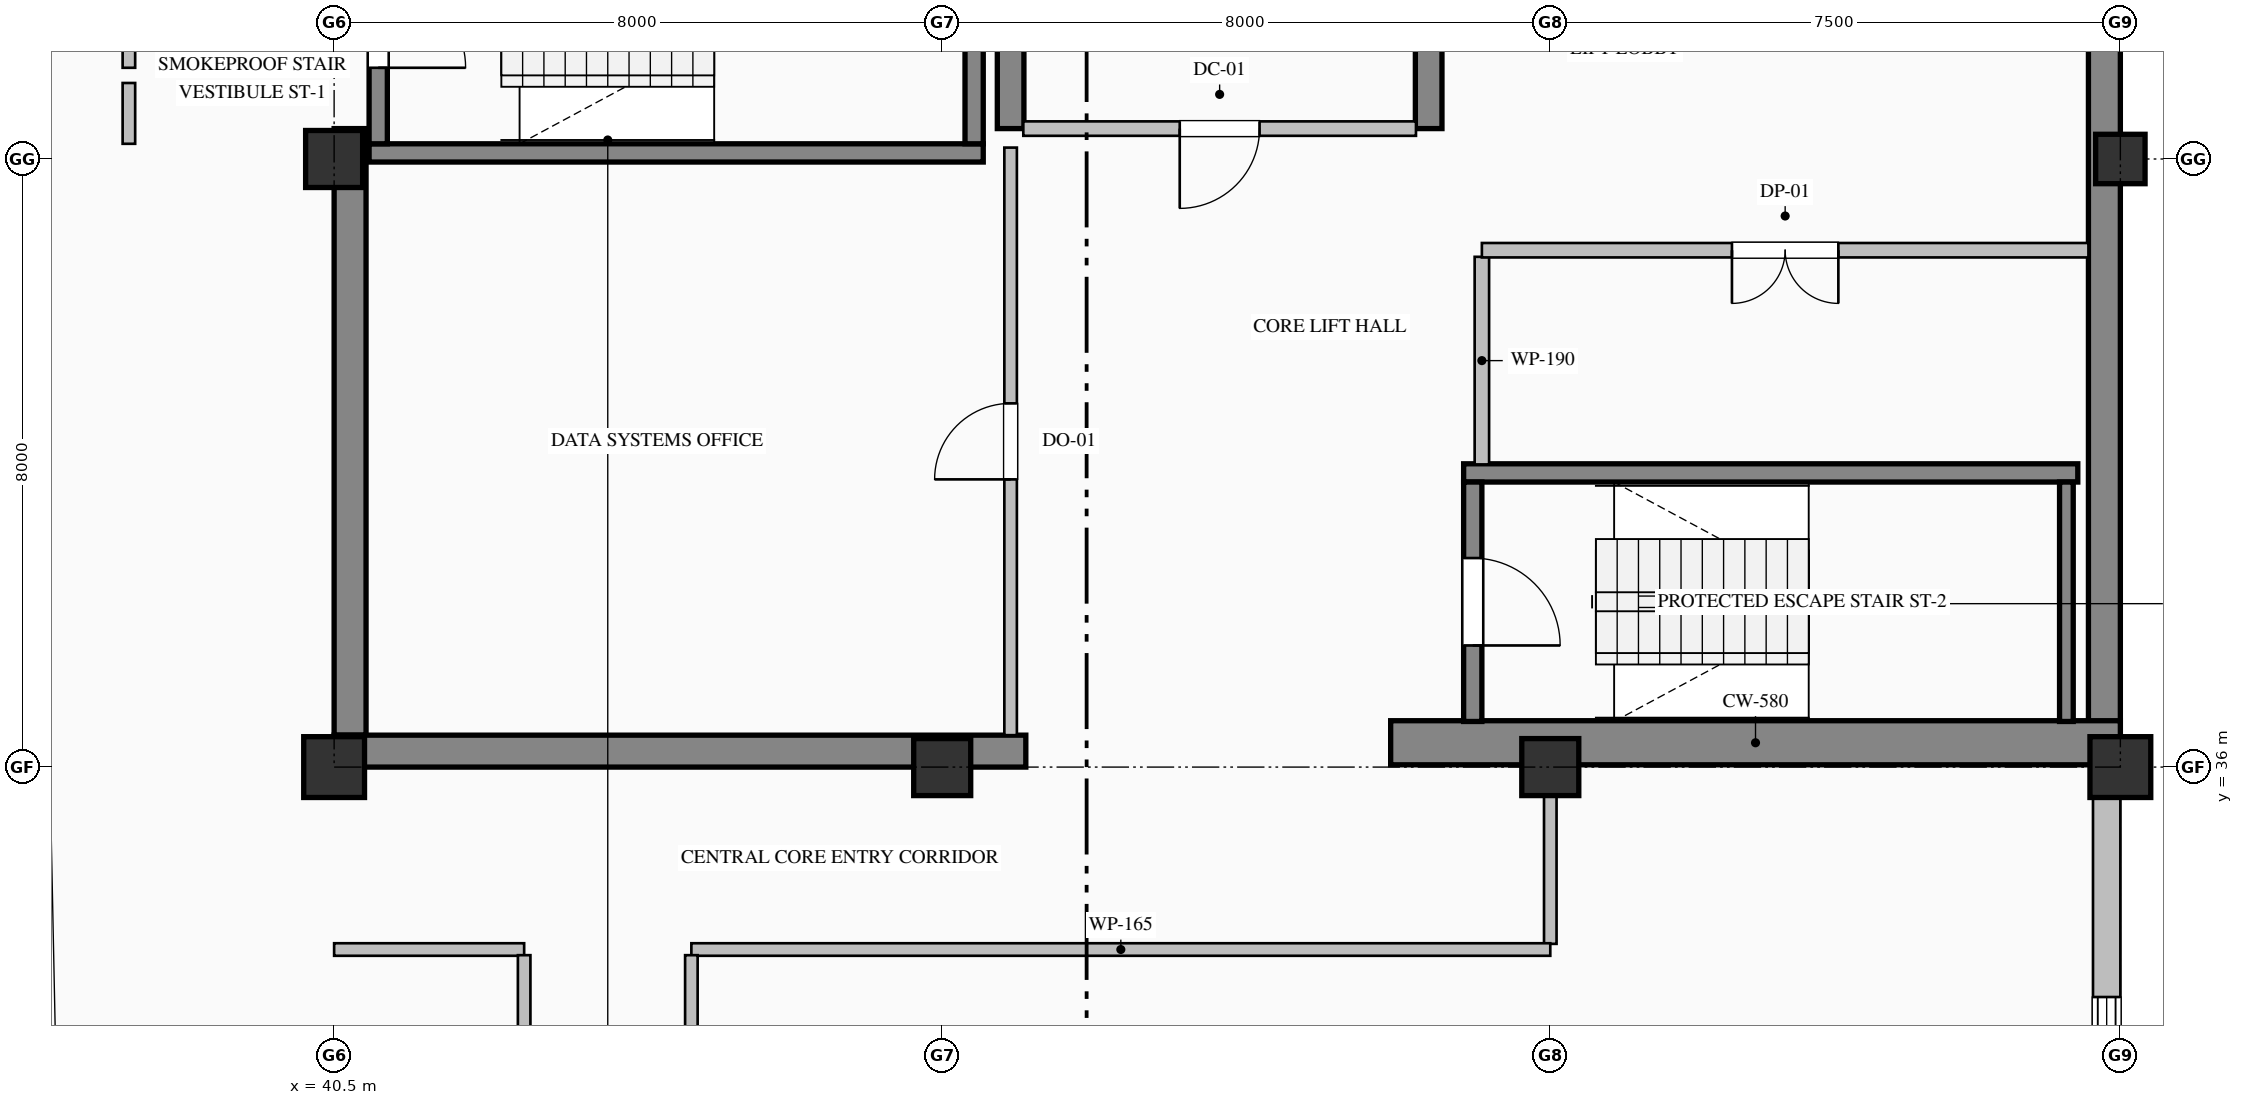
"""IFC4 building model, lengths in metres.
Left out: names, types, materials, properties, quantities, classifications, styles, units other than length and angle.
Written with IfcOpenShell. Run it as: python <this file> out.ifc"""

import sys

from ifc_helpers import new_model, si_unit, direction, frame, frame_2d, origin, origin_2d, place, context, subcontext, project, spatial, rectangle, hollow_rectangle, extrude, element, fill, save


model = new_model("IFC4")
c1 = context("Model", 3, precision=1e-05, world=origin(), true_north=direction((0.0, 1.0)))
c2 = subcontext(c1, "Body", "Model", "MODEL_VIEW")
j1 = project(units=[si_unit("LENGTHUNIT", "METRE"), si_unit("PLANEANGLEUNIT", "RADIAN")], contexts=[c1])
p1 = place(None, origin())
s1 = spatial("IfcSite", under=j1, at=p1, CompositionType="ELEMENT")
p2 = place(p1, origin())
s2 = spatial("IfcBuilding", under=s1, at=p2, CompositionType="ELEMENT")
p3 = place(p2, frame((0.0, 0.0, 303.2)))
s3 = spatial("IfcBuildingStorey", under=s2, at=p3, CompositionType="ELEMENT", Elevation=303.2)
p4 = place(p3, frame((63.79, 36.32, 0.0), z_axis=(0.0, 0.0, 1.0), x_axis=(0.0, 1.0, 0.0)))
e1 = element("IfcWall", 1, at=p4, inside=s3, PredefinedType="SHEAR", context=c2, shape_type="SweptSolid", body=[
    extrude(rectangle(XDim=15.26, YDim=0.42, at=frame_2d((7.63, 0.0))), origin(), (0.0, 0.0, 1.0), 3.785),
])
p5 = place(p3, frame((40.71, 36.42, 0.0), z_axis=(0.0, 0.0, 1.0), x_axis=(0.0, 1.0, 0.0)))
e2 = element("IfcWall", 2, at=p5, inside=s3, PredefinedType="SHEAR", context=c2, shape_type="SweptSolid", body=[
    extrude(rectangle(XDim=7.98, YDim=0.42, at=frame_2d((3.99, 0.0))), origin(), (0.0, 0.0, 1.0), 3.785),
])
p6 = place(p3, frame((40.5, 36.21, 0.0), z_axis=(0.0, 0.0, 1.0), x_axis=(1.0, 0.0, 0.0)))
e3 = element("IfcWall", 3, at=p6, inside=s3, PredefinedType="SHEAR", context=c2, shape_type="SweptSolid", body=[
    extrude(rectangle(XDim=9.1, YDim=0.42, at=frame_2d((4.55, 0.0))), origin(), (0.0, 0.0, 1.0), 3.785),
])
p7 = place(p3, frame((54.4, 36.32, 0.0), z_axis=(0.0, 0.0, 1.0), x_axis=(1.0, 0.0, 0.0)))
e4 = element("IfcWall", 4, at=p7, inside=s3, PredefinedType="SHEAR", context=c2, shape_type="SweptSolid", body=[
    extrude(rectangle(XDim=9.6, YDim=0.58, at=frame_2d((4.8, 0.0))), origin(), (0.0, 0.0, 1.0), 4.0),
])
p8 = place(p3, frame((49.4, 44.4, 0.0), z_axis=(0.0, 0.0, 1.0), x_axis=(0.0, 1.0, 0.0)))
e5 = element("IfcWall", 5, at=p8, inside=s3, PredefinedType="SHEAR", context=c2, shape_type="SweptSolid", body=[
    extrude(rectangle(XDim=3.0, YDim=0.35, at=frame_2d((1.5, 0.0))), origin(), (0.0, 0.0, 1.0), 3.785),
])
p9 = place(p3, frame((54.9, 44.4, 0.0), z_axis=(0.0, 0.0, 1.0), x_axis=(0.0, 1.0, 0.0)))
e6 = element("IfcWall", 6, at=p9, inside=s3, PredefinedType="SHEAR", context=c2, shape_type="SweptSolid", body=[
    extrude(rectangle(XDim=7.18, YDim=0.35, at=frame_2d((3.59, 0.0))), origin(), (0.0, 0.0, 1.0), 3.785),
])
p10 = place(p3, frame((40.5, 36.0, 0.0), z_axis=(0.0, 0.0, 1.0), x_axis=(1.0, 0.0, 0.0)))
e7 = element("IfcColumn", 7, at=p10, inside=s3, PredefinedType="COLUMN", context=c2, shape_type="SweptSolid", body=[
    extrude(hollow_rectangle(XDim=0.8, YDim=0.8, WallThickness=0.032, at=origin_2d()), origin(), (0.0, 0.0, 1.0), 4.0),
])
for number, where, z_axis, x_axis in (
    (8, (40.5, 44.0, 0.0), (0.0, 0.0, 1.0), (1.0, 0.0, 0.0)),
    (9, (48.5, 36.0, 0.0), (0.0, 0.0, 1.0), (1.0, 0.0, 0.0)),
    (10, (56.5, 36.0, 0.0), (0.0, 0.0, 1.0), (1.0, 0.0, 0.0)),
):
    element("IfcColumn", number, at=place(p3, frame(where, z_axis=z_axis, x_axis=x_axis)), inside=s3, PredefinedType="COLUMN", context=c2, shape_type="SweptSolid", body=[
        extrude(rectangle(XDim=0.75, YDim=0.75, at=origin_2d()), origin(), (0.0, 0.0, 1.0), 4.0),
    ])
p11 = place(p3, frame((64.0, 36.0, 0.0), z_axis=(0.0, 0.0, 1.0), x_axis=(1.0, 0.0, 0.0)))
e11 = element("IfcColumn", 11, at=p11, inside=s3, PredefinedType="COLUMN", context=c2, shape_type="SweptSolid", body=[
    extrude(hollow_rectangle(XDim=0.8, YDim=0.8, WallThickness=0.032, at=origin_2d()), origin(), (0.0, 0.0, 1.0), 4.0),
])
p12 = place(p3, frame((64.0, 44.0, 0.0), z_axis=(0.0, 0.0, 1.0), x_axis=(1.0, 0.0, 0.0)))
e12 = element("IfcColumn", 12, at=p12, inside=s3, PredefinedType="COLUMN", context=c2, shape_type="SweptSolid", body=[
    extrude(hollow_rectangle(XDim=0.65, YDim=0.65, WallThickness=0.028, at=origin_2d()), origin(), (0.0, 0.0, 1.0), 4.0),
])
p13 = place(p3, frame((63.82, 36.05, 0.0), z_axis=(0.0, 0.0, 1.0), x_axis=(0.0, -1.0, 0.0)))
e13 = element("IfcWall", 13, at=p13, inside=s3, PredefinedType="SOLIDWALL", context=c2, shape_type="SweptSolid", body=[
    extrude(rectangle(XDim=13.55, YDim=0.36, at=frame_2d((6.775, 0.0))), origin(), (0.0, 0.0, 1.0), 3.335),
])
p14 = place(p13, frame((3.075, 0.0, 0.8)))
e14 = element("IfcOpeningElement", 14, at=p14, cuts=e13, PredefinedType="OPENING", context=c2, shape_type="SweptSolid", body=[
    extrude(rectangle(XDim=1.05, YDim=2.15, at=frame_2d((0.525, 1.075))), frame((0.0, 0.19, 0.0), z_axis=(0.0, -1.0, 0.0), x_axis=(1.0, 0.0, 0.0)), (0.0, 0.0, 1.0), 0.38),
])
p15 = place(p3, frame((49.04, 44.08, 0.0), z_axis=(0.0, 0.0, 1.0), x_axis=(-1.0, 0.0, 0.0)))
e15 = element("IfcWall", 15, at=p15, inside=s3, PredefinedType="SOLIDWALL", context=c2, shape_type="SweptSolid", body=[
    extrude(rectangle(XDim=8.08, YDim=0.24, at=frame_2d((4.04, 0.0))), origin(), (0.0, 0.0, 1.0), 4.0),
])
p16 = place(p3, frame((41.08, 47.35, 0.0), z_axis=(0.0, 0.0, 1.0), x_axis=(0.0, -1.0, 0.0)))
e16 = element("IfcWall", 16, at=p16, inside=s3, PredefinedType="SOLIDWALL", context=c2, shape_type="SweptSolid", body=[
    extrude(rectangle(XDim=3.15, YDim=0.24, at=frame_2d((1.575, 0.0))), origin(), (0.0, 0.0, 1.0), 4.0),
])
p17 = place(p16, frame((1.0, 0.0, 0.0)))
e17 = element("IfcOpeningElement", 17, at=p17, cuts=e16, PredefinedType="OPENING", context=c2, shape_type="SweptSolid", body=[
    extrude(rectangle(XDim=1.15, YDim=2.2, at=frame_2d((0.575, 1.1))), frame((0.0, 0.13, 0.0), z_axis=(0.0, -1.0, 0.0), x_axis=(1.0, 0.0, 0.0)), (0.0, 0.0, 1.0), 0.26),
])
p18 = place(p3, frame((48.92, 44.2, 0.0), z_axis=(0.0, 0.0, 1.0), x_axis=(0.0, 1.0, 0.0)))
e18 = element("IfcWall", 18, at=p18, inside=s3, PredefinedType="SOLIDWALL", context=c2, shape_type="SweptSolid", body=[
    extrude(rectangle(XDim=3.15, YDim=0.24, at=frame_2d((1.575, 0.0))), origin(), (0.0, 0.0, 1.0), 4.0),
])
p19 = place(p3, frame((55.36, 39.87, 0.0), z_axis=(0.0, 0.0, 1.0), x_axis=(1.0, 0.0, 0.0)))
e19 = element("IfcWall", 19, at=p19, inside=s3, PredefinedType="SOLIDWALL", context=c2, shape_type="SweptSolid", body=[
    extrude(rectangle(XDim=8.08, YDim=0.24, at=frame_2d((4.04, 0.0))), origin(), (0.0, 0.0, 1.0), 4.0),
])
p20 = place(p3, frame((55.48, 39.75, 0.0), z_axis=(0.0, 0.0, 1.0), x_axis=(0.0, -1.0, 0.0)))
e20 = element("IfcWall", 20, at=p20, inside=s3, PredefinedType="SOLIDWALL", context=c2, shape_type="SweptSolid", body=[
    extrude(rectangle(XDim=3.15, YDim=0.24, at=frame_2d((1.575, 0.0))), origin(), (0.0, 0.0, 1.0), 4.0),
])
p21 = place(p20, frame((1.0, 0.0, 0.0)))
e21 = element("IfcOpeningElement", 21, at=p21, cuts=e20, PredefinedType="OPENING", context=c2, shape_type="SweptSolid", body=[
    extrude(rectangle(XDim=1.15, YDim=2.2, at=frame_2d((0.575, 1.1))), frame((0.0, 0.13, 0.0), z_axis=(0.0, -1.0, 0.0), x_axis=(1.0, 0.0, 0.0)), (0.0, 0.0, 1.0), 0.26),
])
p22 = place(p3, frame((63.29, 36.6, 0.0), z_axis=(0.0, 0.0, 1.0), x_axis=(0.0, 1.0, 0.0)))
e22 = element("IfcWall", 22, at=p22, inside=s3, PredefinedType="SOLIDWALL", context=c2, shape_type="SweptSolid", body=[
    extrude(rectangle(XDim=3.15, YDim=0.18, at=frame_2d((1.575, 0.0))), origin(), (0.0, 0.0, 1.0), 4.0),
])
p23 = place(p3, frame((37.8, 45.2, 0.0), z_axis=(0.0, 0.0, 1.0), x_axis=(0.0, 1.0, 0.0)))
e23 = element("IfcWall", 23, at=p23, inside=s3, PredefinedType="PARTITIONING", context=c2, shape_type="SweptSolid", body=[
    extrude(rectangle(XDim=2.125, YDim=0.165, at=frame_2d((1.063, 0.0))), origin(), (0.0, 0.0, 1.0), 3.785),
])
p24 = place(p23, frame((0.538, 0.0, 0.0)))
e24 = element("IfcOpeningElement", 24, at=p24, cuts=e23, PredefinedType="OPENING", context=c2, shape_type="SweptSolid", body=[
    extrude(rectangle(XDim=1.05, YDim=2.15, at=frame_2d((0.525, 1.075))), frame((0.0, 0.093, 0.0), z_axis=(0.0, -1.0, 0.0), x_axis=(1.0, 0.0, 0.0)), (0.0, 0.0, 1.0), 0.185),
])
p25 = place(p3, frame((37.8, 44.2, 0.0), z_axis=(0.0, 0.0, 1.0), x_axis=(0.0, 1.0, 0.0)))
e25 = element("IfcWall", 25, at=p25, inside=s3, PredefinedType="PARTITIONING", context=c2, shape_type="SweptSolid", body=[
    extrude(rectangle(XDim=0.8, YDim=0.165, at=frame_2d((0.4, 0.0))), origin(), (0.0, 0.0, 1.0), 3.785),
])
p26 = place(p3, frame((54.733, 44.4, 0.0), z_axis=(0.0, 0.0, 1.0), x_axis=(-1.0, 0.0, 0.0)))
e26 = element("IfcWall", 26, at=p26, inside=s3, PredefinedType="PARTITIONING", context=c2, shape_type="SweptSolid", body=[
    extrude(rectangle(XDim=5.166, YDim=0.19, at=frame_2d((2.583, 0.0))), origin(), (0.0, 0.0, 1.0), 3.785),
])
p27 = place(p26, frame((2.058, 0.0, 0.0)))
e27 = element("IfcOpeningElement", 27, at=p27, cuts=e26, PredefinedType="OPENING", context=c2, shape_type="SweptSolid", body=[
    extrude(rectangle(XDim=1.05, YDim=2.15, at=frame_2d((0.525, 1.075))), frame((0.0, 0.105, 0.0), z_axis=(0.0, -1.0, 0.0), x_axis=(1.0, 0.0, 0.0)), (0.0, 0.0, 1.0), 0.21),
])
p28 = place(p3, frame((49.4, 36.42, 0.0), z_axis=(0.0, 0.0, 1.0), x_axis=(0.0, 1.0, 0.0)))
e28 = element("IfcWall", 28, at=p28, inside=s3, PredefinedType="PARTITIONING", context=c2, shape_type="SweptSolid", body=[
    extrude(rectangle(XDim=7.73, YDim=0.165, at=frame_2d((3.865, 0.0))), origin(), (0.0, 0.0, 1.0), 3.027),
])
p29 = place(p28, frame((3.365, 0.0, 0.0)))
e29 = element("IfcOpeningElement", 29, at=p29, cuts=e28, PredefinedType="OPENING", context=c2, shape_type="SweptSolid", body=[
    extrude(rectangle(XDim=1.0, YDim=2.15, at=frame_2d((0.5, 1.075))), frame((0.0, 0.093, 0.0), z_axis=(0.0, -1.0, 0.0), x_axis=(1.0, 0.0, 0.0)), (0.0, 0.0, 1.0), 0.185),
])
p30 = place(p3, frame((55.6, 42.713, 0.0), z_axis=(0.0, 0.0, 1.0), x_axis=(0.0, -1.0, 0.0)))
e30 = element("IfcWall", 30, at=p30, inside=s3, PredefinedType="PARTITIONING", context=c2, shape_type="SweptSolid", body=[
    extrude(rectangle(XDim=2.731, YDim=0.19, at=frame_2d((1.365, 0.0))), origin(), (0.0, 0.0, 1.0), 3.785),
])
p31 = place(p3, frame((63.58, 42.8, 0.0), z_axis=(0.0, 0.0, 1.0), x_axis=(-1.0, 0.0, 0.0)))
e31 = element("IfcWall", 31, at=p31, inside=s3, PredefinedType="PARTITIONING", context=c2, shape_type="SweptSolid", body=[
    extrude(rectangle(XDim=7.98, YDim=0.19, at=frame_2d((3.99, 0.0))), origin(), (0.0, 0.0, 1.0), 3.785),
])
p32 = place(p31, frame((3.29, 0.0, 0.0)))
e32 = element("IfcOpeningElement", 32, at=p32, cuts=e31, PredefinedType="OPENING", context=c2, shape_type="SweptSolid", body=[
    extrude(rectangle(XDim=1.4, YDim=2.25, at=frame_2d((0.7, 1.125))), frame((0.0, 0.105, 0.0), z_axis=(0.0, -1.0, 0.0), x_axis=(1.0, 0.0, 0.0)), (0.0, 0.0, 1.0), 0.21),
])
p33 = place(p3, frame((56.5, 36.0, 0.0), z_axis=(0.0, 0.0, 1.0), x_axis=(0.0, -1.0, 0.0)))
e33 = element("IfcWall", 33, at=p33, inside=s3, PredefinedType="PARTITIONING", context=c2, shape_type="SweptSolid", body=[
    extrude(rectangle(XDim=2.325, YDim=0.165, at=frame_2d((1.163, 0.0))), origin(), (0.0, 0.0, 1.0), 3.177),
])
p34 = place(p3, frame((56.5, 33.6, 0.0), z_axis=(0.0, 0.0, 1.0), x_axis=(-1.0, 0.0, 0.0)))
e34 = element("IfcWall", 34, at=p34, inside=s3, PredefinedType="PARTITIONING", context=c2, shape_type="SweptSolid", body=[
    extrude(rectangle(XDim=11.3, YDim=0.165, at=frame_2d((5.65, 0.0))), origin(), (0.0, 0.0, 1.0), 3.785),
])
p35 = place(p3, frame((43.0, 33.6, 0.0), z_axis=(0.0, 0.0, 1.0), x_axis=(-1.0, 0.0, 0.0)))
e35 = element("IfcWall", 35, at=p35, inside=s3, PredefinedType="PARTITIONING", context=c2, shape_type="SweptSolid", body=[
    extrude(rectangle(XDim=2.5, YDim=0.165, at=frame_2d((1.25, 0.0))), origin(), (0.0, 0.0, 1.0), 3.785),
])
p36 = place(p3, frame((45.2, 33.525, 0.0), z_axis=(0.0, 0.0, 1.0), x_axis=(0.0, -1.0, 0.0)))
e36 = element("IfcWall", 36, at=p36, inside=s3, PredefinedType="PARTITIONING", context=c2, shape_type="SweptSolid", body=[
    extrude(rectangle(XDim=8.451, YDim=0.165, at=frame_2d((4.226, 0.0))), origin(), (0.0, 0.0, 1.0), 3.785),
])
p37 = place(p3, frame((43.0, 22.875, 0.0), z_axis=(0.0, 0.0, 1.0), x_axis=(0.0, 1.0, 0.0)))
e37 = element("IfcWall", 37, at=p37, inside=s3, PredefinedType="PARTITIONING", context=c2, shape_type="SweptSolid", body=[
    extrude(rectangle(XDim=10.651, YDim=0.165, at=frame_2d((5.325, 0.0))), origin(), (0.0, 0.0, 1.0), 3.785),
])
p38 = place(p37, frame((4.825, 0.0, 0.0)))
e38 = element("IfcOpeningElement", 38, at=p38, cuts=e37, PredefinedType="OPENING", context=c2, shape_type="SweptSolid", body=[
    extrude(rectangle(XDim=1.0, YDim=2.15, at=frame_2d((0.5, 1.075))), frame((0.0, 0.093, 0.0), z_axis=(0.0, -1.0, 0.0), x_axis=(1.0, 0.0, 0.0)), (0.0, 0.0, 1.0), 0.185),
])
p39 = place(p14, origin())
e39 = element("IfcWindow", 39, at=p39, inside=s3, PartitioningType="SINGLE_PANEL", PredefinedType="WINDOW", context=c2, shape_type="SweptSolid", body=[
    extrude(rectangle(XDim=1.05, YDim=2.15, at=frame_2d((0.525, 1.075))), frame((0.0, 0.15, 0.0), z_axis=(0.0, -1.0, 0.0), x_axis=(1.0, 0.0, 0.0)), (0.0, 0.0, 1.0), 0.06),
])
fill(e14, e39)
p40 = place(p17, origin())
e40 = element("IfcDoor", 40, at=p40, inside=s3, OperationType="SINGLE_SWING_RIGHT", PredefinedType="DOOR", context=c2, shape_type="SweptSolid", body=[
    extrude(rectangle(XDim=1.15, YDim=2.2, at=frame_2d((0.575, 1.1))), frame((0.0, 0.025, 0.0), z_axis=(0.0, -1.0, 0.0), x_axis=(1.0, 0.0, 0.0)), (0.0, 0.0, 1.0), 0.05),
])
fill(e17, e40)
p41 = place(p21, origin())
e41 = element("IfcDoor", 41, at=p41, inside=s3, OperationType="SINGLE_SWING_RIGHT", PredefinedType="DOOR", context=c2, shape_type="SweptSolid", body=[
    extrude(rectangle(XDim=1.15, YDim=2.2, at=frame_2d((0.575, 1.1))), frame((0.0, 0.025, 0.0), z_axis=(0.0, -1.0, 0.0), x_axis=(1.0, 0.0, 0.0)), (0.0, 0.0, 1.0), 0.05),
])
fill(e21, e41)
p42 = place(p27, origin())
e42 = element("IfcDoor", 42, at=p42, inside=s3, OperationType="SINGLE_SWING_RIGHT", PredefinedType="DOOR", context=c2, shape_type="SweptSolid", body=[
    extrude(rectangle(XDim=1.05, YDim=2.15, at=frame_2d((0.525, 1.075))), frame((0.0, 0.025, 0.0), z_axis=(0.0, -1.0, 0.0), x_axis=(1.0, 0.0, 0.0)), (0.0, 0.0, 1.0), 0.05),
])
fill(e27, e42)
p43 = place(p29, origin())
e43 = element("IfcDoor", 43, at=p43, inside=s3, OperationType="SINGLE_SWING_LEFT", PredefinedType="DOOR", context=c2, shape_type="SweptSolid", body=[
    extrude(rectangle(XDim=1.0, YDim=2.15, at=frame_2d((0.5, 1.075))), frame((0.0, 0.025, 0.0), z_axis=(0.0, -1.0, 0.0), x_axis=(1.0, 0.0, 0.0)), (0.0, 0.0, 1.0), 0.05),
])
fill(e29, e43)
p44 = place(p32, origin())
e44 = element("IfcDoor", 44, at=p44, inside=s3, OperationType="DOUBLE_DOOR_SINGLE_SWING", PredefinedType="DOOR", context=c2, shape_type="SweptSolid", body=[
    extrude(rectangle(XDim=1.4, YDim=2.25, at=frame_2d((0.7, 1.125))), frame((0.0, 0.025, 0.0), z_axis=(0.0, -1.0, 0.0), x_axis=(1.0, 0.0, 0.0)), (0.0, 0.0, 1.0), 0.05),
])
fill(e32, e44)
save(model, sys.argv[1])
